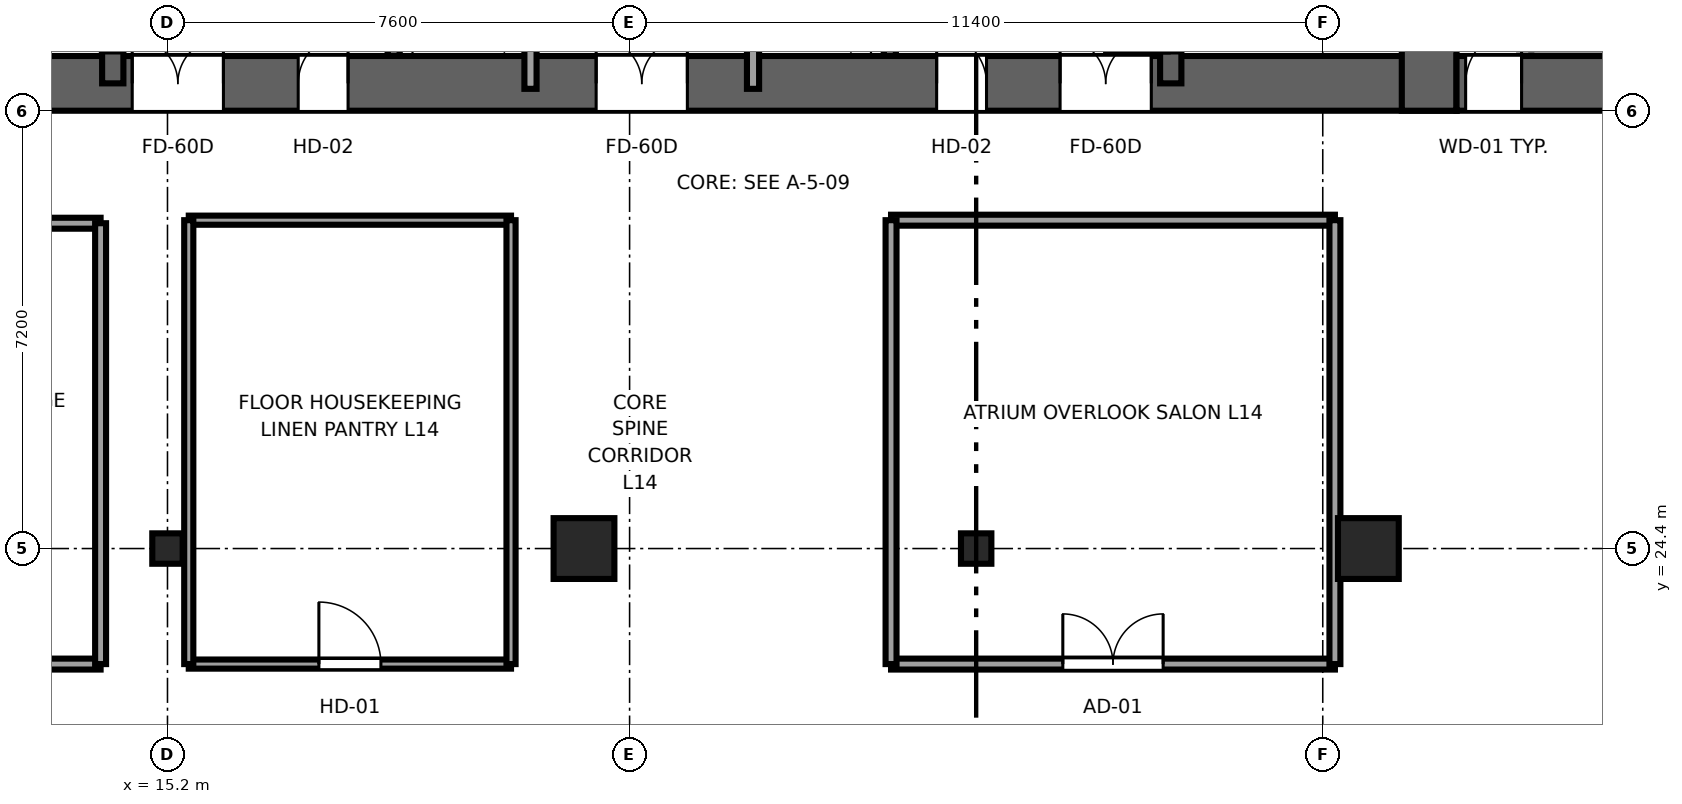
"""IFC4 building model, lengths in metres.
Left out: names, types, materials, properties, quantities, classifications, styles, units other than length and angle.
Written with IfcOpenShell. Run it as: python <this file> out.ifc"""

import sys

from ifc_helpers import new_model, si_unit, direction, frame, frame_2d, origin, origin_2d, place, context, subcontext, project, spatial, rectangle, i_section, extrude, source, transform, mapped, element, fill, save


model = new_model("IFC4")
c1 = context("Model", 3, precision=1e-05, world=origin(), true_north=direction((0.0, 1.0)))
c2 = subcontext(c1, "Body", "Model", "MODEL_VIEW")
j1 = project(units=[si_unit("LENGTHUNIT", "METRE"), si_unit("PLANEANGLEUNIT", "RADIAN")], contexts=[c1])
p1 = place(None, origin())
s1 = spatial("IfcSite", under=j1, at=p1, CompositionType="ELEMENT")
p2 = place(p1, origin())
s2 = spatial("IfcBuilding", under=s1, at=p2, CompositionType="ELEMENT")
p3 = place(p2, frame((0.0, 0.0, 60.4)))
s3 = spatial("IfcBuildingStorey", under=s2, at=p3, CompositionType="ELEMENT", Elevation=60.4)
p4 = place(p3, frame((9.6, 32.05, 0.0), z_axis=(0.0, 0.0, 1.0), x_axis=(1.0, 0.0, 0.0)))
e1 = element("IfcWall", 1, at=p4, inside=s3, PredefinedType="SHEAR", context=c2, shape_type="SweptSolid", body=[
    extrude(rectangle(XDim=26.8, YDim=0.9, at=frame_2d((13.4, 0.0))), origin(), (0.0, 0.0, 1.0), 3.55),
])
p5 = place(p4, frame((6.52, 0.0, 0.0), z_axis=(0.0, 0.0, 1.0), x_axis=(-1.0, 0.0, 0.0)))
e2 = element("IfcOpeningElement", 2, at=p5, cuts=e1, PredefinedType="OPENING", context=c2, shape_type="SweptSolid", body=[
    extrude(rectangle(XDim=1.5, YDim=2.04, at=frame_2d((0.75, 1.02))), frame((0.0, 0.46, 0.0), z_axis=(0.0, -1.0, 0.0), x_axis=(1.0, 0.0, 0.0)), (0.0, 0.0, 1.0), 0.92),
])
p6 = place(p4, frame((14.15, 0.0, 0.0), z_axis=(0.0, 0.0, 1.0), x_axis=(-1.0, 0.0, 0.0)))
e3 = element("IfcOpeningElement", 3, at=p6, cuts=e1, PredefinedType="OPENING", context=c2, shape_type="SweptSolid", body=[
    extrude(rectangle(XDim=1.5, YDim=2.04, at=frame_2d((0.75, 1.02))), frame((0.0, 0.46, 0.0), z_axis=(0.0, -1.0, 0.0), x_axis=(1.0, 0.0, 0.0)), (0.0, 0.0, 1.0), 0.92),
])
p7 = place(p4, frame((21.78, 0.0, 0.0), z_axis=(0.0, 0.0, 1.0), x_axis=(-1.0, 0.0, 0.0)))
e4 = element("IfcOpeningElement", 4, at=p7, cuts=e1, PredefinedType="OPENING", context=c2, shape_type="SweptSolid", body=[
    extrude(rectangle(XDim=1.5, YDim=2.04, at=frame_2d((0.75, 1.02))), frame((0.0, 0.46, 0.0), z_axis=(0.0, -1.0, 0.0), x_axis=(1.0, 0.0, 0.0)), (0.0, 0.0, 1.0), 0.92),
])
p8 = place(p4, frame((8.57, 0.0, 0.0), z_axis=(0.0, 0.0, 1.0), x_axis=(-1.0, 0.0, 0.0)))
e5 = element("IfcOpeningElement", 5, at=p8, cuts=e1, PredefinedType="OPENING", context=c2, shape_type="SweptSolid", body=[
    extrude(rectangle(XDim=0.82, YDim=2.01, at=frame_2d((0.41, 1.005))), frame((0.0, 0.46, 0.0), z_axis=(0.0, -1.0, 0.0), x_axis=(1.0, 0.0, 0.0)), (0.0, 0.0, 1.0), 0.92),
])
p9 = place(p4, frame((19.07, 0.0, 0.0), z_axis=(0.0, 0.0, 1.0), x_axis=(-1.0, 0.0, 0.0)))
e6 = element("IfcOpeningElement", 6, at=p9, cuts=e1, PredefinedType="OPENING", context=c2, shape_type="SweptSolid", body=[
    extrude(rectangle(XDim=0.82, YDim=2.01, at=frame_2d((0.41, 1.005))), frame((0.0, 0.46, 0.0), z_axis=(0.0, -1.0, 0.0), x_axis=(1.0, 0.0, 0.0)), (0.0, 0.0, 1.0), 0.92),
])
p10 = place(p3, frame((35.95, 31.6, 0.0), z_axis=(0.0, 0.0, 1.0), x_axis=(0.0, 1.0, 0.0)))
e7 = element("IfcWall", 7, at=p10, inside=s3, PredefinedType="SHEAR", context=c2, shape_type="SweptSolid", body=[
    extrude(rectangle(XDim=13.6, YDim=0.9, at=frame_2d((6.8, 0.0))), origin(), (0.0, 0.0, 1.0), 3.55),
])
p11 = place(p3, frame((14.3, 32.05, 0.0), z_axis=(0.0, 0.0, 1.0), x_axis=(0.0, 1.0, 0.0)))
e8 = element("IfcWall", 8, at=p11, inside=s3, PredefinedType="SHEAR", context=c2, shape_type="SweptSolid", body=[
    extrude(rectangle(XDim=12.7, YDim=0.35, at=frame_2d((6.35, 0.0))), origin(), (0.0, 0.0, 1.0), 3.55),
])
p12 = place(p11, frame((0.5, 0.0, 0.0)))
e9 = element("IfcOpeningElement", 9, at=p12, cuts=e8, PredefinedType="OPENING", context=c2, shape_type="SweptSolid", body=[
    extrude(rectangle(XDim=1.1, YDim=2.12, at=frame_2d((0.55, 1.06))), frame((0.0, 0.185, 0.0), z_axis=(0.0, -1.0, 0.0), x_axis=(1.0, 0.0, 0.0)), (0.0, 0.0, 1.0), 0.37),
])
p13 = place(p3, frame((31.7, 32.05, 0.0), z_axis=(0.0, 0.0, 1.0), x_axis=(0.0, 1.0, 0.0)))
e10 = element("IfcWall", 10, at=p13, inside=s3, PredefinedType="SHEAR", context=c2, shape_type="SweptSolid", body=[
    extrude(rectangle(XDim=12.7, YDim=0.35, at=frame_2d((6.35, 0.0))), origin(), (0.0, 0.0, 1.0), 3.55),
])
p14 = place(p13, frame((1.6, 0.0, 0.0), z_axis=(0.0, 0.0, 1.0), x_axis=(-1.0, 0.0, 0.0)))
e11 = element("IfcOpeningElement", 11, at=p14, cuts=e10, PredefinedType="OPENING", context=c2, shape_type="SweptSolid", body=[
    extrude(rectangle(XDim=1.1, YDim=2.12, at=frame_2d((0.55, 1.06))), frame((0.0, 0.185, 0.0), z_axis=(0.0, -1.0, 0.0), x_axis=(1.0, 0.0, 0.0)), (0.0, 0.0, 1.0), 0.37),
])
p15 = place(p3, frame((36.4, 32.05, 0.0), z_axis=(0.0, 0.0, 1.0), x_axis=(1.0, 0.0, 0.0)))
e12 = element("IfcWall", 12, at=p15, inside=s3, PredefinedType="SHEAR", context=c2, shape_type="SweptSolid", body=[
    extrude(rectangle(XDim=4.0, YDim=0.9, at=frame_2d((2.0, 0.0))), origin(), (0.0, 0.0, 1.0), 3.55),
])
p16 = place(p15, frame((1.07, 0.0, 0.0), z_axis=(0.0, 0.0, 1.0), x_axis=(-1.0, 0.0, 0.0)))
e13 = element("IfcOpeningElement", 13, at=p16, cuts=e12, PredefinedType="OPENING", context=c2, shape_type="SweptSolid", body=[
    extrude(rectangle(XDim=0.92, YDim=2.01, at=frame_2d((0.46, 1.005))), frame((0.0, 0.46, 0.0), z_axis=(0.0, -1.0, 0.0), x_axis=(1.0, 0.0, 0.0)), (0.0, 0.0, 1.0), 0.92),
])
m1 = source(origin(), c2, "Body", "SweptSolid", [
    extrude(i_section(OverallWidth=0.5, OverallDepth=0.5, WebThickness=0.028, FlangeThickness=0.045, at=origin_2d()), origin(), (0.0, 0.0, 1.0), 3.55),
])
p17 = place(p3, frame((15.2, 24.4, 0.0), z_axis=(0.0, 0.0, 1.0), x_axis=(1.0, 0.0, 0.0)))
e14 = element("IfcColumn", 14, at=p17, inside=s3, PredefinedType="COLUMN", context=c2, shape_type="MappedRepresentation", body=[
    mapped(m1, transform((0.0, 0.0, 0.0), x_axis=(1.0, 0.0, 0.0), y_axis=(0.0, 1.0, 0.0), z_axis=(0.0, 0.0, 1.0), scale=1.0)),
])
m2 = source(origin(), c2, "Body", "SweptSolid", [
    extrude(rectangle(XDim=1.0, YDim=1.0, at=origin_2d()), origin(), (0.0, 0.0, 1.0), 3.55),
])
for number, where, z_axis, x_axis in (
    (15, (22.05, 24.4, 0.0), (0.0, 0.0, 1.0), (1.0, 0.0, 0.0)),
    (16, (34.95, 24.4, 0.0), (0.0, 0.0, 1.0), (1.0, 0.0, 0.0)),
):
    element("IfcColumn", number, at=place(p3, frame(where, z_axis=z_axis, x_axis=x_axis)), inside=s3, PredefinedType="COLUMN", context=c2, shape_type="MappedRepresentation", body=[
        mapped(m2, transform((0.0, 0.0, 0.0), x_axis=(1.0, 0.0, 0.0), y_axis=(0.0, 1.0, 0.0), z_axis=(0.0, 0.0, 1.0), scale=1.0)),
    ])
p18 = place(p3, frame((28.5, 24.4, 0.0), z_axis=(0.0, 0.0, 1.0), x_axis=(1.0, 0.0, 0.0)))
e17 = element("IfcColumn", 17, at=p18, inside=s3, PredefinedType="COLUMN", context=c2, shape_type="MappedRepresentation", body=[
    mapped(m1, transform((0.0, 0.0, 0.0), x_axis=(1.0, 0.0, 0.0), y_axis=(0.0, 1.0, 0.0), z_axis=(0.0, 0.0, 1.0), scale=1.0)),
])
for number, where, z_axis, x_axis in (
    (18, (18.92, 32.504, 0.0), (0.0, 0.0, 1.0), (0.0, 1.0, 0.0)),
    (19, (27.08, 32.504, 0.0), (0.0, 0.0, 1.0), (0.0, 1.0, 0.0)),
):
    element("IfcWall", number, at=place(p3, frame(where, z_axis=z_axis, x_axis=x_axis)), inside=s3, PredefinedType="SOLIDWALL", context=c2, shape_type="SweptSolid", body=[
        extrude(rectangle(XDim=3.646, YDim=0.2, at=frame_2d((1.823, 0.0))), origin(), (0.0, 0.0, 1.0), 3.37),
    ])
for number, where, z_axis, x_axis in (
    (20, (21.17, 31.96, 0.0), (0.0, 0.0, 1.0), (0.0, 1.0, 0.0)),
    (21, (24.83, 31.96, 0.0), (0.0, 0.0, 1.0), (0.0, 1.0, 0.0)),
):
    element("IfcWall", number, at=place(p3, frame(where, z_axis=z_axis, x_axis=x_axis)), inside=s3, PredefinedType="SOLIDWALL", context=c2, shape_type="SweptSolid", body=[
        extrude(rectangle(XDim=12.58, YDim=0.2, at=frame_2d((6.29, 0.0))), origin(), (0.0, 0.0, 1.0), 3.37),
    ])
p19 = place(p3, frame((9.88, 22.5, 0.0), z_axis=(0.0, 0.0, 1.0), x_axis=(1.0, 0.0, 0.0)))
e22 = element("IfcWall", 22, at=p19, inside=s3, PredefinedType="PARTITIONING", context=c2, shape_type="SweptSolid", body=[
    extrude(rectangle(XDim=4.22, YDim=0.18, at=frame_2d((2.11, 0.0))), origin(), (0.0, 0.0, 1.0), 3.37),
])
p20 = place(p19, frame((1.285, 0.0, 0.0)))
e23 = element("IfcOpeningElement", 23, at=p20, cuts=e22, PredefinedType="OPENING", context=c2, shape_type="SweptSolid", body=[
    extrude(rectangle(XDim=1.65, YDim=2.15, at=frame_2d((0.825, 1.075))), frame((0.0, 0.1, 0.0), z_axis=(0.0, -1.0, 0.0), x_axis=(1.0, 0.0, 0.0)), (0.0, 0.0, 1.0), 0.2),
])
p21 = place(p3, frame((9.88, 29.75, 0.0), z_axis=(0.0, 0.0, 1.0), x_axis=(1.0, 0.0, 0.0)))
e24 = element("IfcWall", 24, at=p21, inside=s3, PredefinedType="PARTITIONING", context=c2, shape_type="SweptSolid", body=[
    extrude(rectangle(XDim=4.22, YDim=0.18, at=frame_2d((2.11, 0.0))), origin(), (0.0, 0.0, 1.0), 3.37),
])
p22 = place(p3, frame((14.1, 22.5, 0.0), z_axis=(0.0, 0.0, 1.0), x_axis=(0.0, 1.0, 0.0)))
e25 = element("IfcWall", 25, at=p22, inside=s3, PredefinedType="PARTITIONING", context=c2, shape_type="SweptSolid", body=[
    extrude(rectangle(XDim=7.25, YDim=0.18, at=frame_2d((3.625, 0.0))), origin(), (0.0, 0.0, 1.0), 3.37),
])
p23 = place(p3, frame((27.1, 22.5, 0.0), z_axis=(0.0, 0.0, 1.0), x_axis=(1.0, 0.0, 0.0)))
e26 = element("IfcWall", 26, at=p23, inside=s3, PredefinedType="PARTITIONING", context=c2, shape_type="SweptSolid", body=[
    extrude(rectangle(XDim=7.3, YDim=0.18, at=frame_2d((3.65, 0.0))), origin(), (0.0, 0.0, 1.0), 3.37),
])
p24 = place(p23, frame((2.825, 0.0, 0.0)))
e27 = element("IfcOpeningElement", 27, at=p24, cuts=e26, PredefinedType="OPENING", context=c2, shape_type="SweptSolid", body=[
    extrude(rectangle(XDim=1.65, YDim=2.15, at=frame_2d((0.825, 1.075))), frame((0.0, 0.1, 0.0), z_axis=(0.0, -1.0, 0.0), x_axis=(1.0, 0.0, 0.0)), (0.0, 0.0, 1.0), 0.2),
])
p25 = place(p3, frame((27.1, 29.8, 0.0), z_axis=(0.0, 0.0, 1.0), x_axis=(1.0, 0.0, 0.0)))
e28 = element("IfcWall", 28, at=p25, inside=s3, PredefinedType="PARTITIONING", context=c2, shape_type="SweptSolid", body=[
    extrude(rectangle(XDim=7.3, YDim=0.18, at=frame_2d((3.65, 0.0))), origin(), (0.0, 0.0, 1.0), 3.37),
])
for number, where, z_axis, x_axis in (
    (29, (27.1, 22.5, 0.0), (0.0, 0.0, 1.0), (0.0, 1.0, 0.0)),
    (30, (34.4, 22.5, 0.0), (0.0, 0.0, 1.0), (0.0, 1.0, 0.0)),
):
    element("IfcWall", number, at=place(p3, frame(where, z_axis=z_axis, x_axis=x_axis)), inside=s3, PredefinedType="PARTITIONING", context=c2, shape_type="SweptSolid", body=[
        extrude(rectangle(XDim=7.3, YDim=0.18, at=frame_2d((3.65, 0.0))), origin(), (0.0, 0.0, 1.0), 3.37),
    ])
p26 = place(p3, frame((15.55, 22.5, 0.0), z_axis=(0.0, 0.0, 1.0), x_axis=(1.0, 0.0, 0.0)))
e31 = element("IfcWall", 31, at=p26, inside=s3, PredefinedType="PARTITIONING", context=c2, shape_type="SweptSolid", body=[
    extrude(rectangle(XDim=5.3, YDim=0.15, at=frame_2d((2.65, 0.0))), origin(), (0.0, 0.0, 1.0), 3.37),
])
p27 = place(p26, frame((2.14, 0.0, 0.0)))
e32 = element("IfcOpeningElement", 32, at=p27, cuts=e31, PredefinedType="OPENING", context=c2, shape_type="SweptSolid", body=[
    extrude(rectangle(XDim=1.02, YDim=2.03, at=frame_2d((0.51, 1.015))), frame((0.0, 0.085, 0.0), z_axis=(0.0, -1.0, 0.0), x_axis=(1.0, 0.0, 0.0)), (0.0, 0.0, 1.0), 0.17),
])
p28 = place(p3, frame((15.55, 29.8, 0.0), z_axis=(0.0, 0.0, 1.0), x_axis=(1.0, 0.0, 0.0)))
e33 = element("IfcWall", 33, at=p28, inside=s3, PredefinedType="PARTITIONING", context=c2, shape_type="SweptSolid", body=[
    extrude(rectangle(XDim=5.3, YDim=0.15, at=frame_2d((2.65, 0.0))), origin(), (0.0, 0.0, 1.0), 3.37),
])
for number, where, z_axis, x_axis in (
    (34, (15.55, 22.5, 0.0), (0.0, 0.0, 1.0), (0.0, 1.0, 0.0)),
    (35, (20.85, 22.5, 0.0), (0.0, 0.0, 1.0), (0.0, 1.0, 0.0)),
):
    element("IfcWall", number, at=place(p3, frame(where, z_axis=z_axis, x_axis=x_axis)), inside=s3, PredefinedType="PARTITIONING", context=c2, shape_type="SweptSolid", body=[
        extrude(rectangle(XDim=7.3, YDim=0.15, at=frame_2d((3.65, 0.0))), origin(), (0.0, 0.0, 1.0), 3.37),
    ])
m3 = source(origin(), c2, "Body", "SweptSolid", [
    extrude(rectangle(XDim=1.1, YDim=2.12, at=frame_2d((0.55, 1.06))), frame((0.0, 0.025, 0.0), z_axis=(0.0, -1.0, 0.0), x_axis=(1.0, 0.0, 0.0)), (0.0, 0.0, 1.0), 0.05),
])
p29 = place(p12, origin())
e36 = element("IfcDoor", 36, at=p29, inside=s3, OperationType="SINGLE_SWING_RIGHT", PredefinedType="DOOR", context=c2, shape_type="MappedRepresentation", body=[
    mapped(m3, transform((0.0, 0.0, 0.0), x_axis=(1.0, 0.0, 0.0), y_axis=(0.0, 1.0, 0.0), z_axis=(0.0, 0.0, 1.0), scale=1.0)),
])
fill(e9, e36)
p30 = place(p14, origin())
e37 = element("IfcDoor", 37, at=p30, inside=s3, OperationType="SINGLE_SWING_LEFT", PredefinedType="DOOR", context=c2, shape_type="MappedRepresentation", body=[
    mapped(m3, transform((0.0, 0.0, 0.0), x_axis=(1.0, 0.0, 0.0), y_axis=(0.0, 1.0, 0.0), z_axis=(0.0, 0.0, 1.0), scale=1.0)),
])
fill(e11, e37)
m4 = source(origin(), c2, "Body", "SweptSolid", [
    extrude(rectangle(XDim=1.5, YDim=2.04, at=frame_2d((0.75, 1.02))), frame((0.0, 0.025, 0.0), z_axis=(0.0, -1.0, 0.0), x_axis=(1.0, 0.0, 0.0)), (0.0, 0.0, 1.0), 0.05),
])
p31 = place(p5, origin())
e38 = element("IfcDoor", 38, at=p31, inside=s3, OperationType="DOUBLE_DOOR_SINGLE_SWING", PredefinedType="DOOR", context=c2, shape_type="MappedRepresentation", body=[
    mapped(m4, transform((0.0, 0.0, 0.0), x_axis=(1.0, 0.0, 0.0), y_axis=(0.0, 1.0, 0.0), z_axis=(0.0, 0.0, 1.0), scale=1.0)),
])
fill(e2, e38)
p32 = place(p6, origin())
e39 = element("IfcDoor", 39, at=p32, inside=s3, OperationType="DOUBLE_DOOR_SINGLE_SWING", PredefinedType="DOOR", context=c2, shape_type="MappedRepresentation", body=[
    mapped(m4, transform((0.0, 0.0, 0.0), x_axis=(1.0, 0.0, 0.0), y_axis=(0.0, 1.0, 0.0), z_axis=(0.0, 0.0, 1.0), scale=1.0)),
])
fill(e3, e39)
p33 = place(p7, origin())
e40 = element("IfcDoor", 40, at=p33, inside=s3, OperationType="DOUBLE_DOOR_SINGLE_SWING", PredefinedType="DOOR", context=c2, shape_type="MappedRepresentation", body=[
    mapped(m4, transform((0.0, 0.0, 0.0), x_axis=(1.0, 0.0, 0.0), y_axis=(0.0, 1.0, 0.0), z_axis=(0.0, 0.0, 1.0), scale=1.0)),
])
fill(e4, e40)
m5 = source(origin(), c2, "Body", "SweptSolid", [
    extrude(rectangle(XDim=0.82, YDim=2.01, at=frame_2d((0.41, 1.005))), frame((0.0, 0.025, 0.0), z_axis=(0.0, -1.0, 0.0), x_axis=(1.0, 0.0, 0.0)), (0.0, 0.0, 1.0), 0.05),
])
p34 = place(p8, origin())
e41 = element("IfcDoor", 41, at=p34, inside=s3, OperationType="SINGLE_SWING_RIGHT", PredefinedType="DOOR", context=c2, shape_type="MappedRepresentation", body=[
    mapped(m5, transform((0.0, 0.0, 0.0), x_axis=(1.0, 0.0, 0.0), y_axis=(0.0, 1.0, 0.0), z_axis=(0.0, 0.0, 1.0), scale=1.0)),
])
fill(e5, e41)
p35 = place(p9, origin())
e42 = element("IfcDoor", 42, at=p35, inside=s3, OperationType="SINGLE_SWING_LEFT", PredefinedType="DOOR", context=c2, shape_type="MappedRepresentation", body=[
    mapped(m5, transform((0.0, 0.0, 0.0), x_axis=(1.0, 0.0, 0.0), y_axis=(0.0, 1.0, 0.0), z_axis=(0.0, 0.0, 1.0), scale=1.0)),
])
fill(e6, e42)
m6 = source(origin(), c2, "Body", "SweptSolid", [
    extrude(rectangle(XDim=0.92, YDim=2.01, at=frame_2d((0.46, 1.005))), frame((0.0, 0.025, 0.0), z_axis=(0.0, -1.0, 0.0), x_axis=(1.0, 0.0, 0.0)), (0.0, 0.0, 1.0), 0.05),
])
p36 = place(p16, origin())
e43 = element("IfcDoor", 43, at=p36, inside=s3, OperationType="SINGLE_SWING_RIGHT", PredefinedType="DOOR", context=c2, shape_type="MappedRepresentation", body=[
    mapped(m6, transform((0.0, 0.0, 0.0), x_axis=(1.0, 0.0, 0.0), y_axis=(0.0, 1.0, 0.0), z_axis=(0.0, 0.0, 1.0), scale=1.0)),
])
fill(e13, e43)
m7 = source(origin(), c2, "Body", "SweptSolid", [
    extrude(rectangle(XDim=1.65, YDim=2.15, at=frame_2d((0.825, 1.075))), frame((0.0, 0.025, 0.0), z_axis=(0.0, -1.0, 0.0), x_axis=(1.0, 0.0, 0.0)), (0.0, 0.0, 1.0), 0.05),
])
p37 = place(p24, origin())
e44 = element("IfcDoor", 44, at=p37, inside=s3, OperationType="DOUBLE_DOOR_SINGLE_SWING", PredefinedType="DOOR", context=c2, shape_type="MappedRepresentation", body=[
    mapped(m7, transform((0.0, 0.0, 0.0), x_axis=(1.0, 0.0, 0.0), y_axis=(0.0, 1.0, 0.0), z_axis=(0.0, 0.0, 1.0), scale=1.0)),
])
fill(e27, e44)
m8 = source(origin(), c2, "Body", "SweptSolid", [
    extrude(rectangle(XDim=1.02, YDim=2.03, at=frame_2d((0.51, 1.015))), frame((0.0, 0.025, 0.0), z_axis=(0.0, -1.0, 0.0), x_axis=(1.0, 0.0, 0.0)), (0.0, 0.0, 1.0), 0.05),
])
p38 = place(p27, origin())
e45 = element("IfcDoor", 45, at=p38, inside=s3, OperationType="SINGLE_SWING_LEFT", PredefinedType="DOOR", context=c2, shape_type="MappedRepresentation", body=[
    mapped(m8, transform((0.0, 0.0, 0.0), x_axis=(1.0, 0.0, 0.0), y_axis=(0.0, 1.0, 0.0), z_axis=(0.0, 0.0, 1.0), scale=1.0)),
])
fill(e32, e45)
save(model, sys.argv[1])
